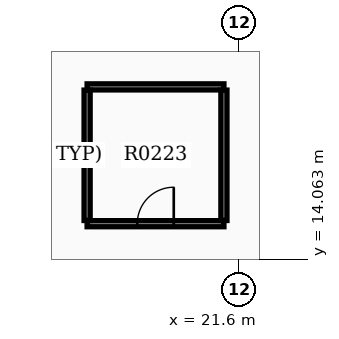
"""IFC4 building model, lengths in metres.
Left out: names, types, materials, properties, quantities, classifications, styles, units other than length and angle.
Written with IfcOpenShell. Run it as: python <this file> out.ifc"""

import sys

from ifc_helpers import new_model, si_unit, direction, frame, frame_2d, origin, place, context, subcontext, project, spatial, rectangle, extrude, element, fill, save


model = new_model("IFC4")
c1 = context("Model", 3, precision=1e-05, world=origin(), true_north=direction((0.0, 1.0)))
c2 = subcontext(c1, "Body", "Model", "MODEL_VIEW")
j1 = project(units=[si_unit("LENGTHUNIT", "METRE"), si_unit("PLANEANGLEUNIT", "RADIAN")], contexts=[c1])
p1 = place(None, origin())
s1 = spatial("IfcSite", under=j1, at=p1, CompositionType="ELEMENT")
p2 = place(p1, origin())
s2 = spatial("IfcBuilding", under=s1, at=p2, CompositionType="ELEMENT")
p3 = place(p2, frame((0.0, 0.0, 14.7)))
s3 = spatial("IfcBuildingStorey", under=s2, at=p3, CompositionType="ELEMENT", Elevation=14.7)
p4 = place(p3, frame((17.6, 15.0, 0.0), z_axis=(0.0, 0.0, 1.0), x_axis=(1.0, 0.0, 0.0)))
e1 = element("IfcWall", 1, at=p4, inside=s3, PredefinedType="PARTITIONING", context=c2, shape_type="SweptSolid", body=[
    extrude(rectangle(XDim=3.6, YDim=0.16, at=frame_2d((1.8, 0.0))), origin(), (0.0, 0.0, 1.0), 3.32),
])
p5 = place(p4, frame((1.32, 0.0, 0.0)))
e2 = element("IfcOpeningElement", 2, at=p5, cuts=e1, PredefinedType="OPENING", context=c2, shape_type="SweptSolid", body=[
    extrude(rectangle(XDim=0.96, YDim=2.15, at=frame_2d((0.48, 1.075))), frame((0.0, 0.09, 0.0), z_axis=(0.0, -1.0, 0.0), x_axis=(1.0, 0.0, 0.0)), (0.0, 0.0, 1.0), 0.18),
])
p6 = place(p3, frame((17.6, 18.6, 0.0), z_axis=(0.0, 0.0, 1.0), x_axis=(1.0, 0.0, 0.0)))
e3 = element("IfcWall", 3, at=p6, inside=s3, PredefinedType="PARTITIONING", context=c2, shape_type="SweptSolid", body=[
    extrude(rectangle(XDim=3.6, YDim=0.16, at=frame_2d((1.8, 0.0))), origin(), (0.0, 0.0, 1.0), 3.32),
])
for number, where, z_axis, x_axis in (
    (4, (17.6, 15.085, 0.0), (0.0, 0.0, 1.0), (0.0, 1.0, 0.0)),
    (5, (21.2, 15.085, 0.0), (0.0, 0.0, 1.0), (0.0, 1.0, 0.0)),
):
    element("IfcWall", number, at=place(p3, frame(where, z_axis=z_axis, x_axis=x_axis)), inside=s3, PredefinedType="PARTITIONING", context=c2, shape_type="SweptSolid", body=[
        extrude(rectangle(XDim=3.43, YDim=0.16, at=frame_2d((1.715, 0.0))), origin(), (0.0, 0.0, 1.0), 3.32),
    ])
p7 = place(p5, origin())
e6 = element("IfcDoor", 6, at=p7, inside=s3, OperationType="SINGLE_SWING_RIGHT", PredefinedType="DOOR", context=c2, shape_type="SweptSolid", body=[
    extrude(rectangle(XDim=0.96, YDim=2.15, at=frame_2d((0.48, 1.075))), frame((0.0, 0.025, 0.0), z_axis=(0.0, -1.0, 0.0), x_axis=(1.0, 0.0, 0.0)), (0.0, 0.0, 1.0), 0.05),
])
fill(e2, e6)
save(model, sys.argv[1])
